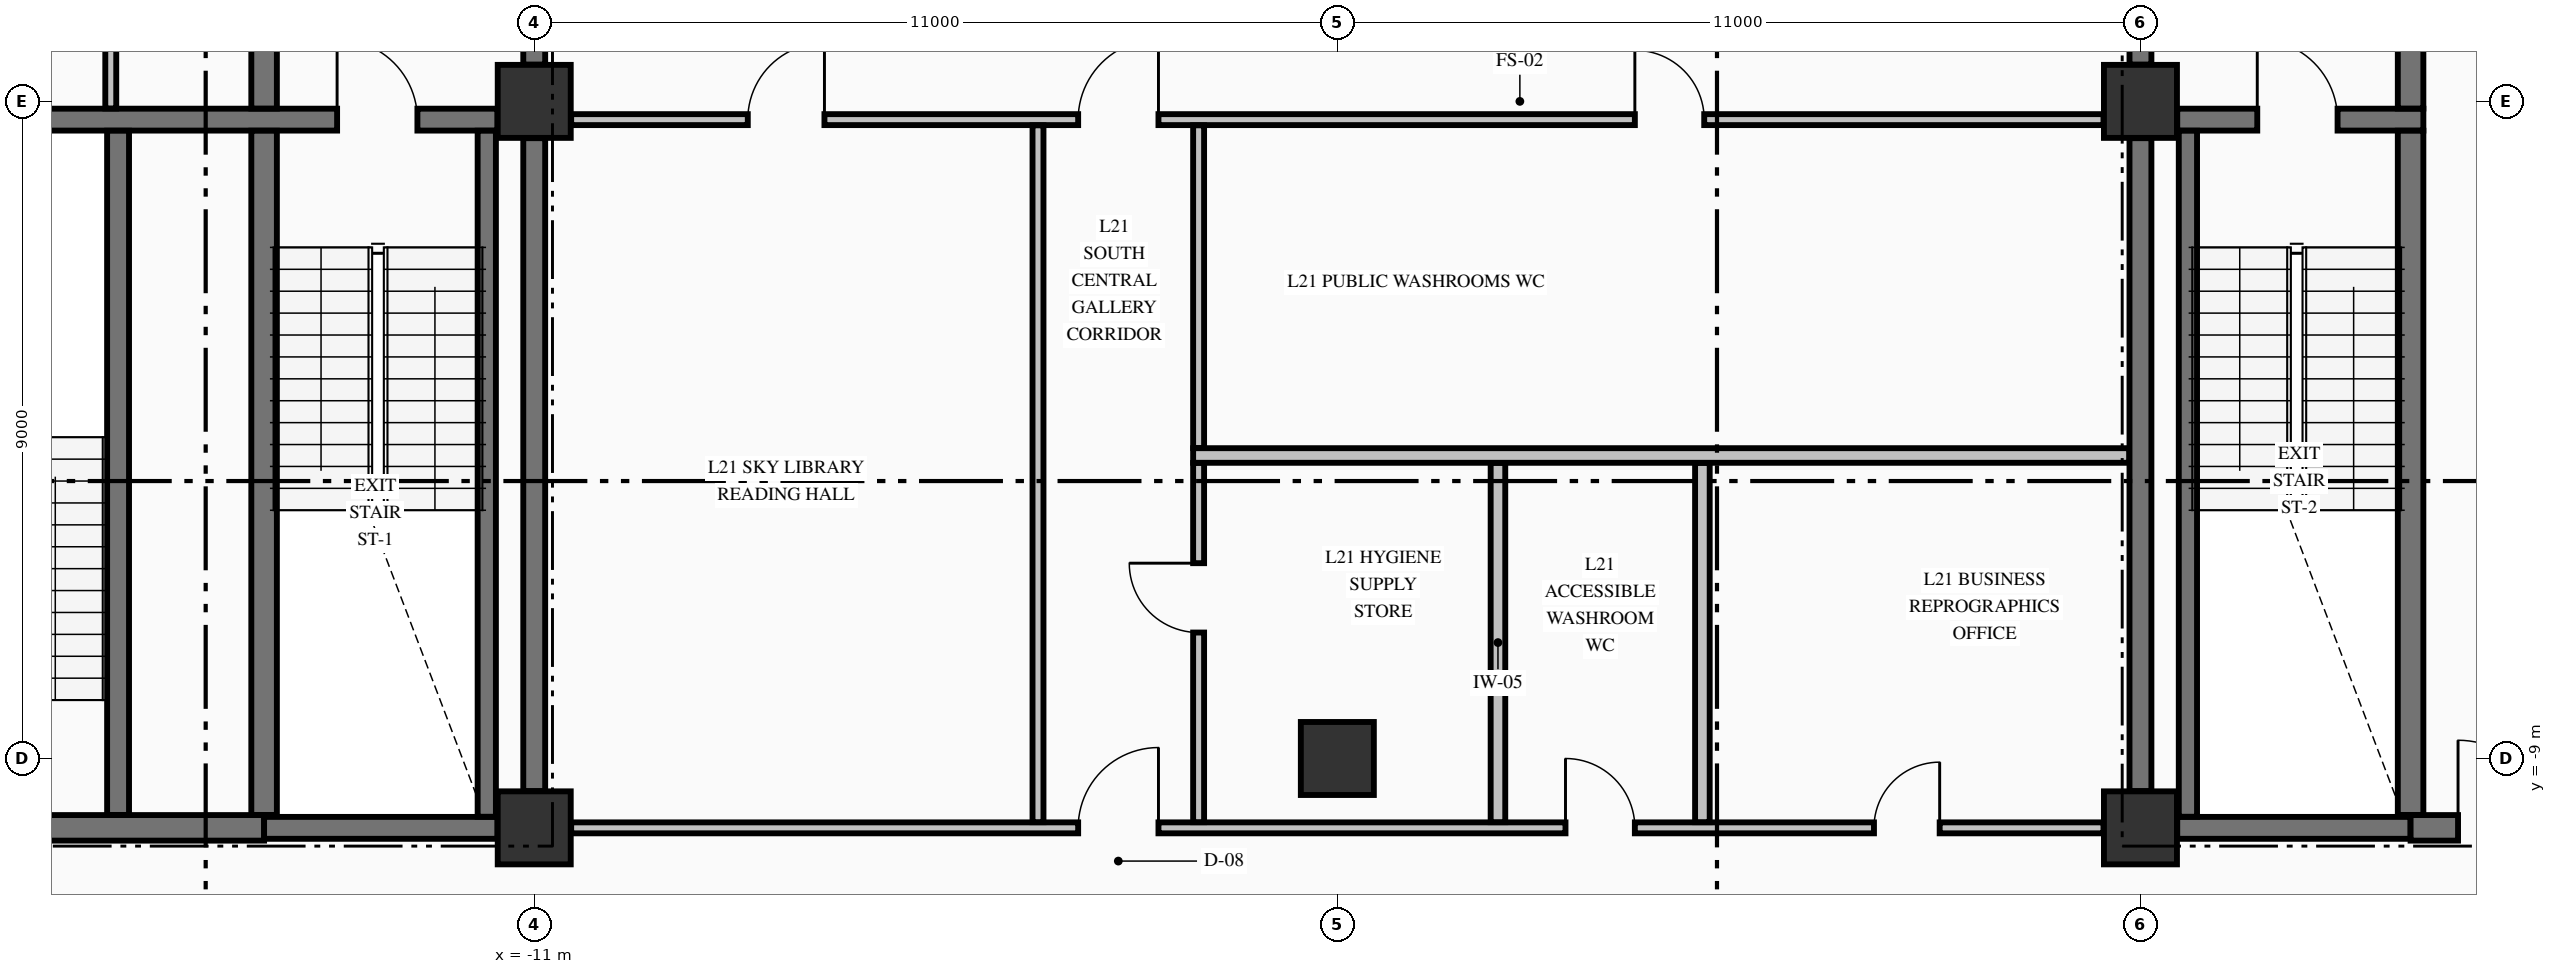
"""IFC4 building model, lengths in metres.
Left out: names, types, materials, properties, quantities, classifications, styles, units other than length and angle.
Written with IfcOpenShell. Run it as: python <this file> out.ifc"""

import sys

from ifc_helpers import new_model, si_unit, direction, frame, frame_2d, origin, origin_2d, place, context, subcontext, project, spatial, rectangle, extrude, element, fill, save


model = new_model("IFC4")
c1 = context("Model", 3, precision=1e-05, world=origin(), true_north=direction((0.0, 1.0)))
c2 = subcontext(c1, "Body", "Model", "MODEL_VIEW")
j1 = project(units=[si_unit("LENGTHUNIT", "METRE"), si_unit("PLANEANGLEUNIT", "RADIAN")], contexts=[c1])
p1 = place(None, origin())
s1 = spatial("IfcSite", under=j1, at=p1, CompositionType="ELEMENT")
p2 = place(p1, origin())
s2 = spatial("IfcBuilding", under=s1, at=p2, CompositionType="ELEMENT")
p3 = place(p2, frame((0.0, 0.0, 86.94)))
s3 = spatial("IfcBuildingStorey", under=s2, at=p3, CompositionType="ELEMENT", Elevation=86.94)
for number, where, z_axis, x_axis in (
    (1, (-11.0, -9.95, -0.425), (0.0, 0.0, 1.0), (1.0, 0.0, 0.0)),
    (2, (-11.0, 0.0, -0.425), (0.0, 0.0, 1.0), (1.0, 0.0, 0.0)),
    (3, (11.0, -9.95, -0.425), (0.0, 0.0, 1.0), (1.0, 0.0, 0.0)),
    (4, (11.0, 0.0, -0.425), (0.0, 0.0, 1.0), (1.0, 0.0, 0.0)),
    (5, (0.0, -9.0, -0.425), (0.0, 0.0, 1.0), (1.0, 0.0, 0.0)),
):
    element("IfcColumn", number, at=place(p3, frame(where, z_axis=z_axis, x_axis=x_axis)), inside=s3, PredefinedType="COLUMN", context=c2, shape_type="SweptSolid", body=[
        extrude(rectangle(XDim=1.0, YDim=1.0, at=origin_2d()), origin(), (0.0, 0.0, 1.0), 4.595),
    ])
p4 = place(p3, frame((-19.496, -9.95, 0.0), z_axis=(0.0, 0.0, 1.0), x_axis=(1.0, 0.0, 0.0)))
e6 = element("IfcWall", 6, at=p4, inside=s3, PredefinedType="SHEAR", context=c2, shape_type="SweptSolid", body=[
    extrude(rectangle(XDim=4.796, YDim=0.35, at=frame_2d((2.398, 0.0))), origin(), (0.0, 0.0, 1.0), 4.17),
])
p5 = place(p4, frame((0.671, 0.0, 0.0)))
e7 = element("IfcOpeningElement", 7, at=p5, cuts=e6, PredefinedType="OPENING", context=c2, shape_type="SweptSolid", body=[
    extrude(rectangle(XDim=1.05, YDim=2.15, at=frame_2d((0.525, 1.075))), frame((0.0, 0.185, 0.0), z_axis=(0.0, -1.0, 0.0), x_axis=(1.0, 0.0, 0.0)), (0.0, 0.0, 1.0), 0.37),
])
for number, where, z_axis, x_axis in (
    (8, (-14.7, -9.95, 0.0), (0.0, 0.0, 1.0), (1.0, 0.0, 0.0)),
    (9, (11.504, -9.95, 0.0), (0.0, 0.0, 1.0), (1.0, 0.0, 0.0)),
):
    element("IfcWall", number, at=place(p3, frame(where, z_axis=z_axis, x_axis=x_axis)), inside=s3, PredefinedType="SHEAR", context=c2, shape_type="SweptSolid", body=[
        extrude(rectangle(XDim=3.196, YDim=0.3, at=frame_2d((1.598, 0.0))), origin(), (0.0, 0.0, 1.0), 4.17),
    ])
p6 = place(p3, frame((14.7, -9.95, 0.0), z_axis=(0.0, 0.0, 1.0), x_axis=(1.0, 0.0, 0.0)))
e10 = element("IfcWall", 10, at=p6, inside=s3, PredefinedType="SHEAR", context=c2, shape_type="SweptSolid", body=[
    extrude(rectangle(XDim=4.796, YDim=0.35, at=frame_2d((2.398, 0.0))), origin(), (0.0, 0.0, 1.0), 4.17),
])
p7 = place(p6, frame((0.65, 0.0, 0.0)))
e11 = element("IfcOpeningElement", 11, at=p7, cuts=e10, PredefinedType="OPENING", context=c2, shape_type="SweptSolid", body=[
    extrude(rectangle(XDim=1.2, YDim=2.15, at=frame_2d((0.6, 1.075))), frame((0.0, 0.185, 0.0), z_axis=(0.0, -1.0, 0.0), x_axis=(1.0, 0.0, 0.0)), (0.0, 0.0, 1.0), 0.37),
])
p8 = place(p3, frame((-19.496, -0.25, 0.0), z_axis=(0.0, 0.0, 1.0), x_axis=(1.0, 0.0, 0.0)))
e12 = element("IfcWall", 12, at=p8, inside=s3, PredefinedType="SHEAR", context=c2, shape_type="SweptSolid", body=[
    extrude(rectangle(XDim=7.992, YDim=0.3, at=frame_2d((3.996, 0.0))), origin(), (0.0, 0.0, 1.0), 4.17),
])
p9 = place(p8, frame((5.796, 0.0, 0.0)))
e13 = element("IfcOpeningElement", 13, at=p9, cuts=e12, PredefinedType="OPENING", context=c2, shape_type="SweptSolid", body=[
    extrude(rectangle(XDim=1.1, YDim=2.15, at=frame_2d((0.55, 1.075))), frame((0.0, 0.16, 0.0), z_axis=(0.0, -1.0, 0.0), x_axis=(1.0, 0.0, 0.0)), (0.0, 0.0, 1.0), 0.32),
])
p10 = place(p3, frame((11.504, -0.25, 0.0), z_axis=(0.0, 0.0, 1.0), x_axis=(1.0, 0.0, 0.0)))
e14 = element("IfcWall", 14, at=p10, inside=s3, PredefinedType="SHEAR", context=c2, shape_type="SweptSolid", body=[
    extrude(rectangle(XDim=3.371, YDim=0.3, at=frame_2d((1.686, 0.0))), origin(), (0.0, 0.0, 1.0), 4.17),
])
p11 = place(p10, frame((1.096, 0.0, 0.0)))
e15 = element("IfcOpeningElement", 15, at=p11, cuts=e14, PredefinedType="OPENING", context=c2, shape_type="SweptSolid", body=[
    extrude(rectangle(XDim=1.1, YDim=2.15, at=frame_2d((0.55, 1.075))), frame((0.0, 0.16, 0.0), z_axis=(0.0, -1.0, 0.0), x_axis=(1.0, 0.0, 0.0)), (0.0, 0.0, 1.0), 0.32),
])
p12 = place(p3, frame((-10.494, -9.95, 0.0), z_axis=(0.0, 0.0, 1.0), x_axis=(1.0, 0.0, 0.0)))
e16 = element("IfcWall", 16, at=p12, inside=s3, PredefinedType="PARTITIONING", context=c2, shape_type="SweptSolid", body=[
    extrude(rectangle(XDim=20.988, YDim=0.15, at=frame_2d((10.494, 0.0))), origin(), (0.0, 0.0, 1.0), 4.17),
])
p13 = place(p12, frame((6.944, 0.0, 0.0)))
e17 = element("IfcOpeningElement", 17, at=p13, cuts=e16, PredefinedType="OPENING", context=c2, shape_type="SweptSolid", body=[
    extrude(rectangle(XDim=1.1, YDim=2.15, at=frame_2d((0.55, 1.075))), frame((0.0, 0.085, 0.0), z_axis=(0.0, -1.0, 0.0), x_axis=(1.0, 0.0, 0.0)), (0.0, 0.0, 1.0), 0.17),
])
p14 = place(p12, frame((13.619, 0.0, 0.0)))
e18 = element("IfcOpeningElement", 18, at=p14, cuts=e16, PredefinedType="OPENING", context=c2, shape_type="SweptSolid", body=[
    extrude(rectangle(XDim=0.95, YDim=2.15, at=frame_2d((0.475, 1.075))), frame((0.0, 0.085, 0.0), z_axis=(0.0, -1.0, 0.0), x_axis=(1.0, 0.0, 0.0)), (0.0, 0.0, 1.0), 0.17),
])
p15 = place(p12, frame((17.844, 0.0, 0.0)))
e19 = element("IfcOpeningElement", 19, at=p15, cuts=e16, PredefinedType="OPENING", context=c2, shape_type="SweptSolid", body=[
    extrude(rectangle(XDim=0.9, YDim=2.15, at=frame_2d((0.45, 1.075))), frame((0.0, 0.085, 0.0), z_axis=(0.0, -1.0, 0.0), x_axis=(1.0, 0.0, 0.0)), (0.0, 0.0, 1.0), 0.17),
])
p16 = place(p3, frame((-1.975, -4.85, 0.0), z_axis=(0.0, 0.0, 1.0), x_axis=(1.0, 0.0, 0.0)))
e20 = element("IfcWall", 20, at=p16, inside=s3, PredefinedType="PARTITIONING", context=c2, shape_type="SweptSolid", body=[
    extrude(rectangle(XDim=12.822, YDim=0.2, at=frame_2d((6.411, 0.0))), origin(), (0.0, 0.0, 1.0), 4.17),
])
p17 = place(p3, frame((-10.494, -0.25, 0.0), z_axis=(0.0, 0.0, 1.0), x_axis=(1.0, 0.0, 0.0)))
e21 = element("IfcWall", 21, at=p17, inside=s3, PredefinedType="PARTITIONING", context=c2, shape_type="SweptSolid", body=[
    extrude(rectangle(XDim=20.988, YDim=0.15, at=frame_2d((10.494, 0.0))), origin(), (0.0, 0.0, 1.0), 4.17),
])
p18 = place(p17, frame((6.944, 0.0, 0.0)))
e22 = element("IfcOpeningElement", 22, at=p18, cuts=e21, PredefinedType="OPENING", context=c2, shape_type="SweptSolid", body=[
    extrude(rectangle(XDim=1.1, YDim=2.15, at=frame_2d((0.55, 1.075))), frame((0.0, 0.085, 0.0), z_axis=(0.0, -1.0, 0.0), x_axis=(1.0, 0.0, 0.0)), (0.0, 0.0, 1.0), 0.17),
])
p19 = place(p17, frame((2.419, 0.0, 0.0)))
e23 = element("IfcOpeningElement", 23, at=p19, cuts=e21, PredefinedType="OPENING", context=c2, shape_type="SweptSolid", body=[
    extrude(rectangle(XDim=1.05, YDim=2.15, at=frame_2d((0.525, 1.075))), frame((0.0, 0.085, 0.0), z_axis=(0.0, -1.0, 0.0), x_axis=(1.0, 0.0, 0.0)), (0.0, 0.0, 1.0), 0.17),
])
p20 = place(p17, frame((14.569, 0.0, 0.0)))
e24 = element("IfcOpeningElement", 24, at=p20, cuts=e21, PredefinedType="OPENING", context=c2, shape_type="SweptSolid", body=[
    extrude(rectangle(XDim=0.95, YDim=2.15, at=frame_2d((0.475, 1.075))), frame((0.0, 0.085, 0.0), z_axis=(0.0, -1.0, 0.0), x_axis=(1.0, 0.0, 0.0)), (0.0, 0.0, 1.0), 0.17),
])
p21 = place(p3, frame((-16.7, -9.773, 0.0), z_axis=(0.0, 0.0, 1.0), x_axis=(0.0, 1.0, 0.0)))
e25 = element("IfcWall", 25, at=p21, inside=s3, PredefinedType="SHEAR", context=c2, shape_type="SweptSolid", body=[
    extrude(rectangle(XDim=9.371, YDim=0.3, at=frame_2d((4.686, 0.0))), origin(), (0.0, 0.0, 1.0), 4.17),
])
p22 = place(p3, frame((-14.7, -9.773, 0.0), z_axis=(0.0, 0.0, 1.0), x_axis=(0.0, 1.0, 0.0)))
e26 = element("IfcWall", 26, at=p22, inside=s3, PredefinedType="SHEAR", context=c2, shape_type="SweptSolid", body=[
    extrude(rectangle(XDim=9.371, YDim=0.35, at=frame_2d((4.686, 0.0))), origin(), (0.0, 0.0, 1.0), 4.17),
])
p23 = place(p3, frame((-14.7, -0.098, 0.0), z_axis=(0.0, 0.0, 1.0), x_axis=(0.0, 1.0, 0.0)))
e27 = element("IfcWall", 27, at=p23, inside=s3, PredefinedType="SHEAR", context=c2, shape_type="SweptSolid", body=[
    extrude(rectangle(XDim=2.846, YDim=0.35, at=frame_2d((1.423, 0.0))), origin(), (0.0, 0.0, 1.0), 4.17),
])
p24 = place(p3, frame((-11.65, -9.798, 0.0), z_axis=(0.0, 0.0, 1.0), x_axis=(0.0, 1.0, 0.0)))
e28 = element("IfcWall", 28, at=p24, inside=s3, PredefinedType="SOLIDWALL", context=c2, shape_type="SweptSolid", body=[
    extrude(rectangle(XDim=9.396, YDim=0.25, at=frame_2d((4.698, 0.0))), origin(), (0.0, 0.0, 1.0), 4.17),
])
p25 = place(p3, frame((-11.0, -9.446, 0.0), z_axis=(0.0, 0.0, 1.0), x_axis=(0.0, 1.0, 0.0)))
e29 = element("IfcWall", 29, at=p25, inside=s3, PredefinedType="SHEAR", context=c2, shape_type="SweptSolid", body=[
    extrude(rectangle(XDim=8.942, YDim=0.3, at=frame_2d((4.471, 0.0))), origin(), (0.0, 0.0, 1.0), 4.17),
])
p26 = place(p3, frame((-11.0, 0.504, 0.0), z_axis=(0.0, 0.0, 1.0), x_axis=(0.0, 1.0, 0.0)))
e30 = element("IfcWall", 30, at=p26, inside=s3, PredefinedType="SHEAR", context=c2, shape_type="SweptSolid", body=[
    extrude(rectangle(XDim=2.244, YDim=0.3, at=frame_2d((1.122, 0.0))), origin(), (0.0, 0.0, 1.0), 4.17),
])
p27 = place(p26, frame((0.596, 0.0, 0.0)))
e31 = element("IfcOpeningElement", 31, at=p27, cuts=e30, PredefinedType="OPENING", context=c2, shape_type="SweptSolid", body=[
    extrude(rectangle(XDim=1.1, YDim=2.15, at=frame_2d((0.55, 1.075))), frame((0.0, 0.16, 0.0), z_axis=(0.0, -1.0, 0.0), x_axis=(1.0, 0.0, 0.0)), (0.0, 0.0, 1.0), 0.32),
])
p28 = place(p3, frame((11.0, -9.446, 0.0), z_axis=(0.0, 0.0, 1.0), x_axis=(0.0, 1.0, 0.0)))
e32 = element("IfcWall", 32, at=p28, inside=s3, PredefinedType="SHEAR", context=c2, shape_type="SweptSolid", body=[
    extrude(rectangle(XDim=8.942, YDim=0.3, at=frame_2d((4.471, 0.0))), origin(), (0.0, 0.0, 1.0), 4.17),
])
p29 = place(p3, frame((11.0, 0.504, 0.0), z_axis=(0.0, 0.0, 1.0), x_axis=(0.0, 1.0, 0.0)))
e33 = element("IfcWall", 33, at=p29, inside=s3, PredefinedType="SHEAR", context=c2, shape_type="SweptSolid", body=[
    extrude(rectangle(XDim=2.244, YDim=0.3, at=frame_2d((1.122, 0.0))), origin(), (0.0, 0.0, 1.0), 4.17),
])
p30 = place(p29, frame((0.596, 0.0, 0.0)))
e34 = element("IfcOpeningElement", 34, at=p30, cuts=e33, PredefinedType="OPENING", context=c2, shape_type="SweptSolid", body=[
    extrude(rectangle(XDim=1.1, YDim=2.15, at=frame_2d((0.55, 1.075))), frame((0.0, 0.16, 0.0), z_axis=(0.0, -1.0, 0.0), x_axis=(1.0, 0.0, 0.0)), (0.0, 0.0, 1.0), 0.32),
])
p31 = place(p3, frame((11.65, -9.798, 0.0), z_axis=(0.0, 0.0, 1.0), x_axis=(0.0, 1.0, 0.0)))
e35 = element("IfcWall", 35, at=p31, inside=s3, PredefinedType="SOLIDWALL", context=c2, shape_type="SweptSolid", body=[
    extrude(rectangle(XDim=9.396, YDim=0.25, at=frame_2d((4.698, 0.0))), origin(), (0.0, 0.0, 1.0), 4.17),
])
p32 = place(p3, frame((14.7, -9.773, 0.0), z_axis=(0.0, 0.0, 1.0), x_axis=(0.0, 1.0, 0.0)))
e36 = element("IfcWall", 36, at=p32, inside=s3, PredefinedType="SHEAR", context=c2, shape_type="SweptSolid", body=[
    extrude(rectangle(XDim=9.371, YDim=0.35, at=frame_2d((4.686, 0.0))), origin(), (0.0, 0.0, 1.0), 4.17),
])
p33 = place(p3, frame((14.7, -0.098, 0.0), z_axis=(0.0, 0.0, 1.0), x_axis=(0.0, 1.0, 0.0)))
e37 = element("IfcWall", 37, at=p33, inside=s3, PredefinedType="SHEAR", context=c2, shape_type="SweptSolid", body=[
    extrude(rectangle(XDim=2.846, YDim=0.35, at=frame_2d((1.423, 0.0))), origin(), (0.0, 0.0, 1.0), 4.17),
])
p34 = place(p3, frame((-16.8, -0.097, 0.0), z_axis=(0.0, 0.0, 1.0), x_axis=(0.0, 1.0, 0.0)))
e38 = element("IfcWall", 38, at=p34, inside=s3, PredefinedType="PARTITIONING", context=c2, shape_type="SweptSolid", body=[
    extrude(rectangle(XDim=4.819, YDim=0.15, at=frame_2d((2.409, 0.0))), origin(), (0.0, 0.0, 1.0), 4.17),
])
p35 = place(p3, frame((-4.1, -9.872, 0.0), z_axis=(0.0, 0.0, 1.0), x_axis=(0.0, 1.0, 0.0)))
e39 = element("IfcWall", 39, at=p35, inside=s3, PredefinedType="PARTITIONING", context=c2, shape_type="SweptSolid", body=[
    extrude(rectangle(XDim=9.544, YDim=0.15, at=frame_2d((4.772, 0.0))), origin(), (0.0, 0.0, 1.0), 4.17),
])
p36 = place(p3, frame((-1.9, -9.872, 0.0), z_axis=(0.0, 0.0, 1.0), x_axis=(0.0, 1.0, 0.0)))
e40 = element("IfcWall", 40, at=p36, inside=s3, PredefinedType="PARTITIONING", context=c2, shape_type="SweptSolid", body=[
    extrude(rectangle(XDim=4.919, YDim=0.15, at=frame_2d((2.459, 0.0))), origin(), (0.0, 0.0, 1.0), 4.17),
])
p37 = place(p36, frame((2.597, 0.0, 0.0)))
e41 = element("IfcOpeningElement", 41, at=p37, cuts=e40, PredefinedType="OPENING", context=c2, shape_type="SweptSolid", body=[
    extrude(rectangle(XDim=0.95, YDim=2.15, at=frame_2d((0.475, 1.075))), frame((0.0, 0.085, 0.0), z_axis=(0.0, -1.0, 0.0), x_axis=(1.0, 0.0, 0.0)), (0.0, 0.0, 1.0), 0.17),
])
p38 = place(p3, frame((-1.9, -4.747, 0.0), z_axis=(0.0, 0.0, 1.0), x_axis=(0.0, 1.0, 0.0)))
e42 = element("IfcWall", 42, at=p38, inside=s3, PredefinedType="PARTITIONING", context=c2, shape_type="SweptSolid", body=[
    extrude(rectangle(XDim=4.419, YDim=0.15, at=frame_2d((2.209, 0.0))), origin(), (0.0, 0.0, 1.0), 4.17),
])
for number, where, z_axis, x_axis in (
    (43, (2.2, -9.872, 0.0), (0.0, 0.0, 1.0), (0.0, 1.0, 0.0)),
    (44, (5.0, -9.872, 0.0), (0.0, 0.0, 1.0), (0.0, 1.0, 0.0)),
):
    element("IfcWall", number, at=place(p3, frame(where, z_axis=z_axis, x_axis=x_axis)), inside=s3, PredefinedType="PARTITIONING", context=c2, shape_type="SweptSolid", body=[
        extrude(rectangle(XDim=4.919, YDim=0.2, at=frame_2d((2.459, 0.0))), origin(), (0.0, 0.0, 1.0), 4.17),
    ])
p39 = place(p9, origin())
e45 = element("IfcDoor", 45, at=p39, inside=s3, OperationType="SINGLE_SWING_LEFT", PredefinedType="DOOR", context=c2, shape_type="SweptSolid", body=[
    extrude(rectangle(XDim=1.1, YDim=2.15, at=frame_2d((0.55, 1.075))), frame((0.0, 0.025, 0.0), z_axis=(0.0, -1.0, 0.0), x_axis=(1.0, 0.0, 0.0)), (0.0, 0.0, 1.0), 0.05),
])
fill(e13, e45)
p40 = place(p11, origin())
e46 = element("IfcDoor", 46, at=p40, inside=s3, OperationType="SINGLE_SWING_LEFT", PredefinedType="DOOR", context=c2, shape_type="SweptSolid", body=[
    extrude(rectangle(XDim=1.1, YDim=2.15, at=frame_2d((0.55, 1.075))), frame((0.0, 0.025, 0.0), z_axis=(0.0, -1.0, 0.0), x_axis=(1.0, 0.0, 0.0)), (0.0, 0.0, 1.0), 0.05),
])
fill(e15, e46)
p41 = place(p7, origin())
e47 = element("IfcDoor", 47, at=p41, inside=s3, OperationType="SINGLE_SWING_LEFT", PredefinedType="DOOR", context=c2, shape_type="SweptSolid", body=[
    extrude(rectangle(XDim=1.2, YDim=2.15, at=frame_2d((0.6, 1.075))), frame((0.0, 0.025, 0.0), z_axis=(0.0, -1.0, 0.0), x_axis=(1.0, 0.0, 0.0)), (0.0, 0.0, 1.0), 0.05),
])
fill(e11, e47)
p42 = place(p13, origin())
e48 = element("IfcDoor", 48, at=p42, inside=s3, OperationType="SINGLE_SWING_RIGHT", PredefinedType="DOOR", context=c2, shape_type="SweptSolid", body=[
    extrude(rectangle(XDim=1.1, YDim=2.15, at=frame_2d((0.55, 1.075))), frame((0.0, 0.025, 0.0), z_axis=(0.0, -1.0, 0.0), x_axis=(1.0, 0.0, 0.0)), (0.0, 0.0, 1.0), 0.05),
])
fill(e17, e48)
p43 = place(p18, origin())
e49 = element("IfcDoor", 49, at=p43, inside=s3, OperationType="SINGLE_SWING_RIGHT", PredefinedType="DOOR", context=c2, shape_type="SweptSolid", body=[
    extrude(rectangle(XDim=1.1, YDim=2.15, at=frame_2d((0.55, 1.075))), frame((0.0, 0.025, 0.0), z_axis=(0.0, -1.0, 0.0), x_axis=(1.0, 0.0, 0.0)), (0.0, 0.0, 1.0), 0.05),
])
fill(e22, e49)
p44 = place(p19, origin())
e50 = element("IfcDoor", 50, at=p44, inside=s3, OperationType="SINGLE_SWING_RIGHT", PredefinedType="DOOR", context=c2, shape_type="SweptSolid", body=[
    extrude(rectangle(XDim=1.05, YDim=2.15, at=frame_2d((0.525, 1.075))), frame((0.0, 0.025, 0.0), z_axis=(0.0, -1.0, 0.0), x_axis=(1.0, 0.0, 0.0)), (0.0, 0.0, 1.0), 0.05),
])
fill(e23, e50)
p45 = place(p20, origin())
e51 = element("IfcDoor", 51, at=p45, inside=s3, OperationType="SINGLE_SWING_LEFT", PredefinedType="DOOR", context=c2, shape_type="SweptSolid", body=[
    extrude(rectangle(XDim=0.95, YDim=2.15, at=frame_2d((0.475, 1.075))), frame((0.0, 0.025, 0.0), z_axis=(0.0, -1.0, 0.0), x_axis=(1.0, 0.0, 0.0)), (0.0, 0.0, 1.0), 0.05),
])
fill(e24, e51)
p46 = place(p37, origin())
e52 = element("IfcDoor", 52, at=p46, inside=s3, OperationType="SINGLE_SWING_RIGHT", PredefinedType="DOOR", context=c2, shape_type="SweptSolid", body=[
    extrude(rectangle(XDim=0.95, YDim=2.15, at=frame_2d((0.475, 1.075))), frame((0.0, 0.025, 0.0), z_axis=(0.0, -1.0, 0.0), x_axis=(1.0, 0.0, 0.0)), (0.0, 0.0, 1.0), 0.05),
])
fill(e41, e52)
p47 = place(p14, origin())
e53 = element("IfcDoor", 53, at=p47, inside=s3, OperationType="SINGLE_SWING_LEFT", PredefinedType="DOOR", context=c2, shape_type="SweptSolid", body=[
    extrude(rectangle(XDim=0.95, YDim=2.15, at=frame_2d((0.475, 1.075))), frame((0.0, 0.025, 0.0), z_axis=(0.0, -1.0, 0.0), x_axis=(1.0, 0.0, 0.0)), (0.0, 0.0, 1.0), 0.05),
])
fill(e18, e53)
p48 = place(p15, origin())
e54 = element("IfcDoor", 54, at=p48, inside=s3, OperationType="SINGLE_SWING_RIGHT", PredefinedType="DOOR", context=c2, shape_type="SweptSolid", body=[
    extrude(rectangle(XDim=0.9, YDim=2.15, at=frame_2d((0.45, 1.075))), frame((0.0, 0.025, 0.0), z_axis=(0.0, -1.0, 0.0), x_axis=(1.0, 0.0, 0.0)), (0.0, 0.0, 1.0), 0.05),
])
fill(e19, e54)
save(model, sys.argv[1])
